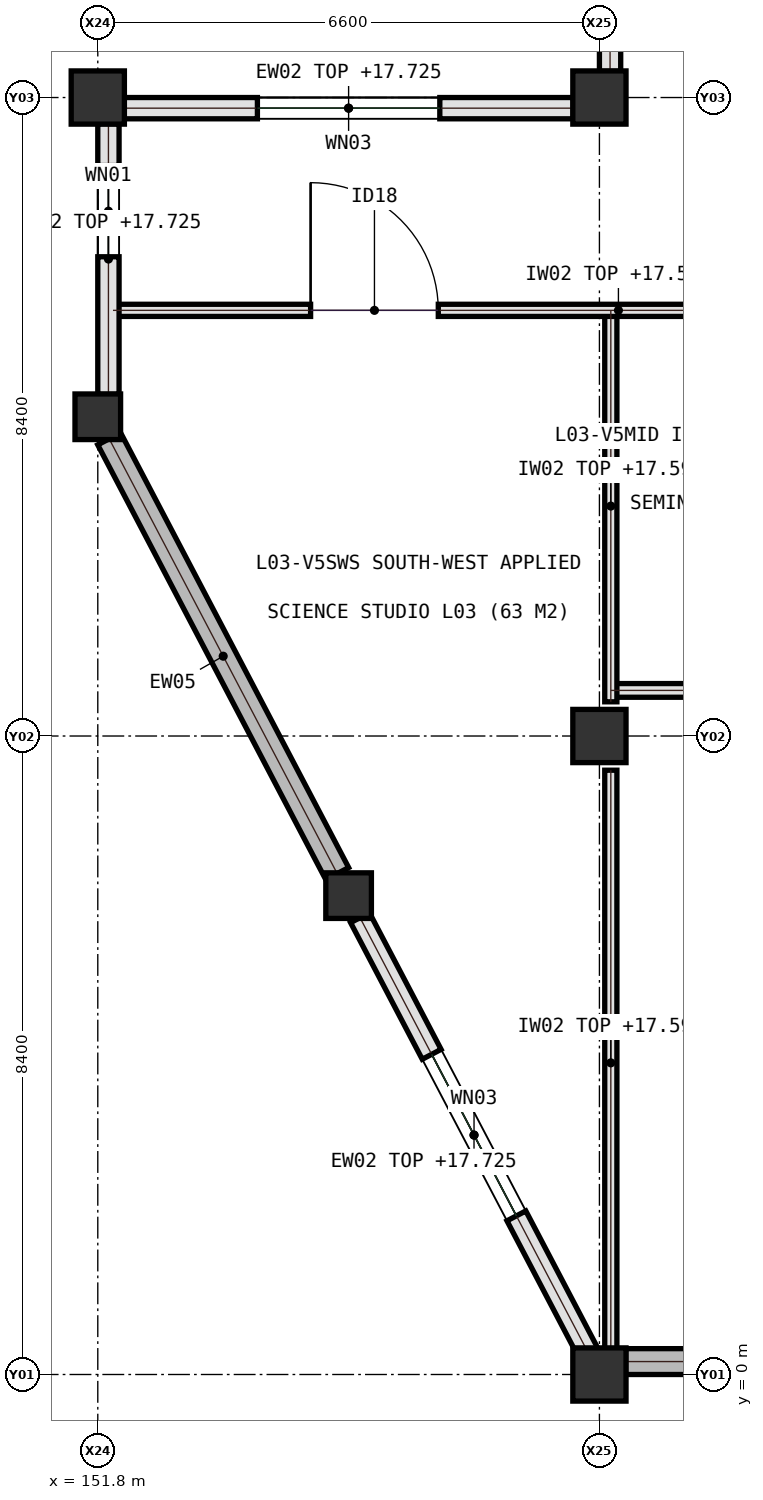
"""IFC4 building model, lengths in metres.
Left out: names, types, materials, properties, quantities, classifications, styles, units other than length and angle.
Written with IfcOpenShell. Run it as: python <this file> out.ifc"""

import sys

from ifc_helpers import new_model, si_unit, direction, frame, frame_2d, origin, origin_2d, place, context, subcontext, project, spatial, rectangle, extrude, element, fill, save


model = new_model("IFC4")
c1 = context("Model", 3, precision=1e-05, world=origin(), true_north=direction((0.0, 1.0)))
c2 = subcontext(c1, "Body", "Model", "MODEL_VIEW")
j1 = project(units=[si_unit("LENGTHUNIT", "METRE"), si_unit("PLANEANGLEUNIT", "RADIAN")], contexts=[c1])
p1 = place(None, origin())
s1 = spatial("IfcSite", under=j1, at=p1, CompositionType="ELEMENT")
p2 = place(p1, origin())
s2 = spatial("IfcBuilding", under=s1, at=p2, CompositionType="ELEMENT")
p3 = place(p2, frame((0.0, 0.0, 14.4)))
s3 = spatial("IfcBuildingStorey", under=s2, at=p3, CompositionType="ELEMENT", Elevation=14.4)
for number, where, z_axis, x_axis in (
    (1, (151.8, 16.8, 0.0), (0.0, 0.0, 1.0), (1.0, 0.0, 0.0)),
    (2, (158.4, 0.0, 0.0), (0.0, 0.0, 1.0), (1.0, 0.0, 0.0)),
    (3, (158.4, 8.4, 0.0), (0.0, 0.0, 1.0), (1.0, 0.0, 0.0)),
    (4, (158.4, 16.8, 0.0), (0.0, 0.0, 1.0), (1.0, 0.0, 0.0)),
):
    element("IfcColumn", number, at=place(p3, frame(where, z_axis=z_axis, x_axis=x_axis)), inside=s3, PredefinedType="COLUMN", context=c2, shape_type="SweptSolid", body=[
        extrude(rectangle(XDim=0.7, YDim=0.7, at=origin_2d()), origin(), (0.0, 0.0, 1.0), 4.2),
    ])
for number, where, z_axis, x_axis in (
    (5, (151.8, 12.6, 0.0), (0.0, 0.0, 1.0), (1.0, 0.0, 0.0)),
    (6, (155.1, 6.3, 0.0), (0.0, 0.0, 1.0), (1.0, 0.0, 0.0)),
):
    element("IfcColumn", number, at=place(p3, frame(where, z_axis=z_axis, x_axis=x_axis)), inside=s3, PredefinedType="COLUMN", context=c2, shape_type="SweptSolid", body=[
        extrude(rectangle(XDim=0.6, YDim=0.6, at=origin_2d()), origin(), (0.0, 0.0, 1.0), 4.2),
    ])
p4 = place(p3, frame((158.55, 9.0, 0.0), z_axis=(0.0, 0.0, 1.0), x_axis=(1.0, 0.0, 0.0)))
e7 = element("IfcWall", 7, at=p4, inside=s3, PredefinedType="SOLIDWALL", context=c2, shape_type="SweptSolid", body=[
    extrude(rectangle(XDim=6.75, YDim=0.18, at=frame_2d((3.375, 0.0))), origin(), (0.0, 0.0, 1.0), 3.19),
])
p5 = place(p4, frame((2.5, 0.0, 0.0)))
e8 = element("IfcOpeningElement", 8, at=p5, cuts=e7, PredefinedType="OPENING", context=c2, shape_type="SweptSolid", body=[
    extrude(rectangle(XDim=1.6, YDim=2.2, at=frame_2d((0.8, 1.1))), frame((0.0, 0.1, 0.0), z_axis=(0.0, -1.0, 0.0), x_axis=(1.0, 0.0, 0.0)), (0.0, 0.0, 1.0), 0.2),
])
p6 = place(p3, frame((158.55, 0.25, 0.0), z_axis=(0.0, 0.0, 1.0), x_axis=(0.0, 1.0, 0.0)))
e9 = element("IfcWall", 9, at=p6, inside=s3, PredefinedType="PARTITIONING", context=c2, shape_type="SweptSolid", body=[
    extrude(rectangle(XDim=7.7, YDim=0.16, at=frame_2d((3.85, 0.0))), origin(), (0.0, 0.0, 1.0), 3.19),
])
p7 = place(p3, frame((158.55, 8.85, 0.0), z_axis=(0.0, 0.0, 1.0), x_axis=(0.0, 1.0, 0.0)))
e10 = element("IfcWall", 10, at=p7, inside=s3, PredefinedType="PARTITIONING", context=c2, shape_type="SweptSolid", body=[
    extrude(rectangle(XDim=5.15, YDim=0.16, at=frame_2d((2.575, 0.0))), origin(), (0.0, 0.0, 1.0), 3.19),
])
p8 = place(p3, frame((152.0, 14.0, 0.0), z_axis=(0.0, 0.0, 1.0), x_axis=(1.0, 0.0, 0.0)))
e11 = element("IfcWall", 11, at=p8, inside=s3, PredefinedType="PARTITIONING", context=c2, shape_type="SweptSolid", body=[
    extrude(rectangle(XDim=13.3, YDim=0.16, at=frame_2d((6.65, 0.0))), origin(), (0.0, 0.0, 1.0), 3.19),
])
p9 = place(p8, frame((2.6, 0.0, 0.0)))
e12 = element("IfcOpeningElement", 12, at=p9, cuts=e11, PredefinedType="OPENING", context=c2, shape_type="SweptSolid", body=[
    extrude(rectangle(XDim=1.68, YDim=2.28, at=frame_2d((0.84, 1.14))), frame((0.0, 0.09, 0.0), z_axis=(0.0, -1.0, 0.0), x_axis=(1.0, 0.0, 0.0)), (0.0, 0.0, 1.0), 0.18),
])
p10 = place(p8, frame((9.8, 0.0, 0.0)))
e13 = element("IfcOpeningElement", 13, at=p10, cuts=e11, PredefinedType="OPENING", context=c2, shape_type="SweptSolid", body=[
    extrude(rectangle(XDim=1.68, YDim=2.28, at=frame_2d((0.84, 1.14))), frame((0.0, 0.09, 0.0), z_axis=(0.0, -1.0, 0.0), x_axis=(1.0, 0.0, 0.0)), (0.0, 0.0, 1.0), 0.18),
])
p11 = place(p3, frame((158.055, 16.66, 0.0), z_axis=(0.0, 0.0, 1.0), x_axis=(-1.0, 0.0, 0.0)))
e14 = element("IfcWall", 14, at=p11, inside=s3, PredefinedType="SOLIDWALL", context=c2, shape_type="SweptSolid", body=[
    extrude(rectangle(XDim=5.91, YDim=0.28, at=frame_2d((2.955, 0.0))), origin(), (0.0, 0.0, 1.0), 3.325),
])
p12 = place(p11, frame((1.755, 0.0, 0.95)))
e15 = element("IfcOpeningElement", 15, at=p12, cuts=e14, PredefinedType="OPENING", context=c2, shape_type="SweptSolid", body=[
    extrude(rectangle(XDim=2.4, YDim=1.6, at=frame_2d((1.2, 0.8))), frame((0.0, 0.15, 0.0), z_axis=(0.0, -1.0, 0.0), x_axis=(1.0, 0.0, 0.0)), (0.0, 0.0, 1.0), 0.3),
])
p13 = place(p3, frame((158.745, 0.17, 0.0), z_axis=(0.0, 0.0, 1.0), x_axis=(1.0, 0.0, 0.0)))
e16 = element("IfcWall", 16, at=p13, inside=s3, PredefinedType="SHEAR", context=c2, shape_type="SweptSolid", body=[
    extrude(rectangle(XDim=5.91, YDim=0.34, at=frame_2d((2.955, 0.0))), origin(), (0.0, 0.0, 1.0), 3.94),
])
p14 = place(p3, frame((158.54, 24.855, 0.0), z_axis=(0.0, 0.0, 1.0), x_axis=(0.0, -1.0, 0.0)))
e17 = element("IfcWall", 17, at=p14, inside=s3, PredefinedType="SOLIDWALL", context=c2, shape_type="SweptSolid", body=[
    extrude(rectangle(XDim=7.71, YDim=0.28, at=frame_2d((3.855, 0.0))), origin(), (0.0, 0.0, 1.0), 3.225),
])
p15 = place(p14, frame((2.555, 0.0, 0.95)))
e18 = element("IfcOpeningElement", 18, at=p15, cuts=e17, PredefinedType="OPENING", context=c2, shape_type="SweptSolid", body=[
    extrude(rectangle(XDim=2.6, YDim=1.9, at=frame_2d((1.3, 0.95))), frame((0.0, 0.15, 0.0), z_axis=(0.0, -1.0, 0.0), x_axis=(1.0, 0.0, 0.0)), (0.0, 0.0, 1.0), 0.3),
])
p16 = place(p3, frame((151.94, 16.455, 0.0), z_axis=(0.0, 0.0, 1.0), x_axis=(0.0, -1.0, 0.0)))
e19 = element("IfcWall", 19, at=p16, inside=s3, PredefinedType="SOLIDWALL", context=c2, shape_type="SweptSolid", body=[
    extrude(rectangle(XDim=3.56, YDim=0.28, at=frame_2d((1.78, 0.0))), origin(), (0.0, 0.0, 1.0), 3.325),
])
p17 = place(p16, frame((0.55, 0.0, 0.95)))
e20 = element("IfcOpeningElement", 20, at=p17, cuts=e19, PredefinedType="OPENING", context=c2, shape_type="SweptSolid", body=[
    extrude(rectangle(XDim=1.2, YDim=1.5, at=frame_2d((0.6, 0.75))), frame((0.0, 0.15, 0.0), z_axis=(0.0, -1.0, 0.0), x_axis=(1.0, 0.0, 0.0)), (0.0, 0.0, 1.0), 0.3),
])
p18 = place(p3, frame((151.95, 12.31, 0.0), z_axis=(0.0, 0.0, 1.0), x_axis=(0.464471613901, -0.885588007981, 0.0)))
e21 = element("IfcWall", 21, at=p18, inside=s3, PredefinedType="SHEAR", context=c2, shape_type="SweptSolid", body=[
    extrude(rectangle(XDim=6.459, YDim=0.34, at=frame_2d((3.229, 0.0))), origin(), (0.0, 0.0, 1.0), 3.94),
])
p19 = place(p3, frame((155.25, 6.01, 0.0), z_axis=(0.0, 0.0, 1.0), x_axis=(0.464471613901, -0.885588007981, 0.0)))
e22 = element("IfcWall", 22, at=p19, inside=s3, PredefinedType="SOLIDWALL", context=c2, shape_type="SweptSolid", body=[
    extrude(rectangle(XDim=6.459, YDim=0.28, at=frame_2d((3.229, 0.0))), origin(), (0.0, 0.0, 1.0), 3.325),
])
p20 = place(p19, frame((2.03, 0.0, 0.95)))
e23 = element("IfcOpeningElement", 23, at=p20, cuts=e22, PredefinedType="OPENING", context=c2, shape_type="SweptSolid", body=[
    extrude(rectangle(XDim=2.4, YDim=1.6, at=frame_2d((1.2, 0.8))), frame((0.0, 0.15, 0.0), z_axis=(0.0, -1.0, 0.0), x_axis=(1.0, 0.0, 0.0)), (0.0, 0.0, 1.0), 0.3),
])
p21 = place(p9, origin())
e24 = element("IfcDoor", 24, at=p21, inside=s3, OperationType="SINGLE_SWING_LEFT", PredefinedType="DOOR", context=c2, shape_type="SweptSolid", body=[
    extrude(rectangle(XDim=1.68, YDim=2.28, at=frame_2d((0.84, 1.14))), frame((0.0, 0.025, 0.0), z_axis=(0.0, -1.0, 0.0), x_axis=(1.0, 0.0, 0.0)), (0.0, 0.0, 1.0), 0.05),
])
fill(e12, e24)
p22 = place(p12, origin())
e25 = element("IfcWindow", 25, at=p22, inside=s3, PartitioningType="SINGLE_PANEL", PredefinedType="WINDOW", context=c2, shape_type="SweptSolid", body=[
    extrude(rectangle(XDim=2.4, YDim=1.6, at=frame_2d((1.2, 0.8))), frame((0.0, 0.03, 0.0), z_axis=(0.0, -1.0, 0.0), x_axis=(1.0, 0.0, 0.0)), (0.0, 0.0, 1.0), 0.06),
])
fill(e15, e25)
p23 = place(p17, origin())
e26 = element("IfcWindow", 26, at=p23, inside=s3, PartitioningType="SINGLE_PANEL", PredefinedType="WINDOW", context=c2, shape_type="SweptSolid", body=[
    extrude(rectangle(XDim=1.2, YDim=1.5, at=frame_2d((0.6, 0.75))), frame((0.0, 0.03, 0.0), z_axis=(0.0, -1.0, 0.0), x_axis=(1.0, 0.0, 0.0)), (0.0, 0.0, 1.0), 0.06),
])
fill(e20, e26)
p24 = place(p20, origin())
e27 = element("IfcWindow", 27, at=p24, inside=s3, PartitioningType="SINGLE_PANEL", PredefinedType="WINDOW", context=c2, shape_type="SweptSolid", body=[
    extrude(rectangle(XDim=2.4, YDim=1.6, at=frame_2d((1.2, 0.8))), frame((0.0, 0.03, 0.0), z_axis=(0.0, -1.0, 0.0), x_axis=(1.0, 0.0, 0.0)), (0.0, 0.0, 1.0), 0.06),
])
fill(e23, e27)
save(model, sys.argv[1])
